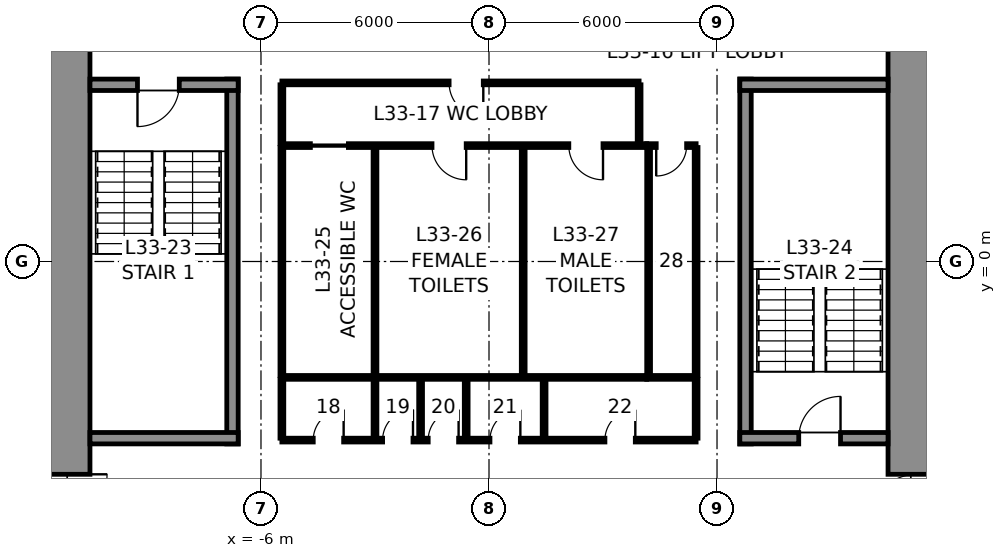
"""IFC4 building model, lengths in metres.
Left out: names, types, materials, properties, quantities, classifications, styles, units other than length and angle.
Written with IfcOpenShell. Run it as: python <this file> out.ifc"""

import sys

from ifc_helpers import new_model, si_unit, direction, frame, frame_2d, origin, place, context, subcontext, project, spatial, rectangle, extrude, element, fill, save


model = new_model("IFC4")
c1 = context("Model", 3, precision=1e-05, world=origin(), true_north=direction((0.0, 1.0)))
c2 = subcontext(c1, "Body", "Model", "MODEL_VIEW")
j1 = project(units=[si_unit("LENGTHUNIT", "METRE"), si_unit("PLANEANGLEUNIT", "RADIAN")], contexts=[c1])
p1 = place(None, origin())
s1 = spatial("IfcSite", under=j1, at=p1, CompositionType="ELEMENT")
p2 = place(p1, origin())
s2 = spatial("IfcBuilding", under=s1, at=p2, CompositionType="ELEMENT")
p3 = place(p2, frame((0.0, 0.0, 159.8)))
s3 = spatial("IfcBuildingStorey", under=s2, at=p3, CompositionType="ELEMENT", Elevation=159.8)
p4 = place(p3, frame((11.25, 10.5, 0.0), z_axis=(0.0, 0.0, 1.0), x_axis=(0.0, -1.0, 0.0)))
e1 = element("IfcWall", 1, at=p4, inside=s3, PredefinedType="SHEAR", context=c2, shape_type="SweptSolid", body=[
    extrude(rectangle(XDim=21.0, YDim=1.5, at=frame_2d((10.5, 0.0))), origin(), (0.0, 0.0, 1.0), 4.0),
])
p5 = place(p4, frame((3.7, 0.0, 0.0)))
e2 = element("IfcOpeningElement", 2, at=p5, cuts=e1, PredefinedType="OPENING", context=c2, shape_type="SweptSolid", body=[
    extrude(rectangle(XDim=1.2, YDim=2.3, at=frame_2d((0.6, 1.15))), frame((0.0, 0.76, 0.0), z_axis=(0.0, -1.0, 0.0), x_axis=(1.0, 0.0, 0.0)), (0.0, 0.0, 1.0), 1.52),
])
p6 = place(p4, frame((16.1, 0.0, 0.0)))
e3 = element("IfcOpeningElement", 3, at=p6, cuts=e1, PredefinedType="OPENING", context=c2, shape_type="SweptSolid", body=[
    extrude(rectangle(XDim=1.2, YDim=2.3, at=frame_2d((0.6, 1.15))), frame((0.0, 0.76, 0.0), z_axis=(0.0, -1.0, 0.0), x_axis=(1.0, 0.0, 0.0)), (0.0, 0.0, 1.0), 1.52),
])
p7 = place(p3, frame((-11.25, -10.5, 0.0), z_axis=(0.0, 0.0, 1.0), x_axis=(0.0, 1.0, 0.0)))
e4 = element("IfcWall", 4, at=p7, inside=s3, PredefinedType="SHEAR", context=c2, shape_type="SweptSolid", body=[
    extrude(rectangle(XDim=21.0, YDim=1.5, at=frame_2d((10.5, 0.0))), origin(), (0.0, 0.0, 1.0), 4.0),
])
p8 = place(p7, frame((16.1, 0.0, 0.0)))
e5 = element("IfcOpeningElement", 5, at=p8, cuts=e4, PredefinedType="OPENING", context=c2, shape_type="SweptSolid", body=[
    extrude(rectangle(XDim=1.2, YDim=2.3, at=frame_2d((0.6, 1.15))), frame((0.0, 0.76, 0.0), z_axis=(0.0, -1.0, 0.0), x_axis=(1.0, 0.0, 0.0)), (0.0, 0.0, 1.0), 1.52),
])
p9 = place(p7, frame((3.7, 0.0, 0.0)))
e6 = element("IfcOpeningElement", 6, at=p9, cuts=e4, PredefinedType="OPENING", context=c2, shape_type="SweptSolid", body=[
    extrude(rectangle(XDim=1.2, YDim=2.3, at=frame_2d((0.6, 1.15))), frame((0.0, 0.76, 0.0), z_axis=(0.0, -1.0, 0.0), x_axis=(1.0, 0.0, 0.0)), (0.0, 0.0, 1.0), 1.52),
])
p10 = place(p3, frame((-6.75, -4.8, 0.0), z_axis=(0.0, 0.0, 1.0), x_axis=(0.0, 1.0, 0.0)))
e7 = element("IfcWall", 7, at=p10, inside=s3, PredefinedType="SOLIDWALL", context=c2, shape_type="SweptSolid", body=[
    extrude(rectangle(XDim=9.6, YDim=0.3, at=frame_2d((4.8, 0.0))), origin(), (0.0, 0.0, 1.0), 3.75),
])
p11 = place(p3, frame((-10.5, 4.65, 0.0), z_axis=(0.0, 0.0, 1.0), x_axis=(1.0, 0.0, 0.0)))
e8 = element("IfcWall", 8, at=p11, inside=s3, PredefinedType="SOLIDWALL", context=c2, shape_type="SweptSolid", body=[
    extrude(rectangle(XDim=3.9, YDim=0.3, at=frame_2d((1.95, 0.0))), origin(), (0.0, 0.0, 1.0), 3.75),
])
p12 = place(p11, frame((1.25, 0.0, 0.0)))
e9 = element("IfcOpeningElement", 9, at=p12, cuts=e8, PredefinedType="OPENING", context=c2, shape_type="SweptSolid", body=[
    extrude(rectangle(XDim=1.1, YDim=2.3, at=frame_2d((0.55, 1.15))), frame((0.0, 0.16, 0.0), z_axis=(0.0, -1.0, 0.0), x_axis=(1.0, 0.0, 0.0)), (0.0, 0.0, 1.0), 0.32),
])
p13 = place(p3, frame((-6.6, -4.65, 0.0), z_axis=(0.0, 0.0, 1.0), x_axis=(-1.0, 0.0, 0.0)))
e10 = element("IfcWall", 10, at=p13, inside=s3, PredefinedType="SOLIDWALL", context=c2, shape_type="SweptSolid", body=[
    extrude(rectangle(XDim=3.9, YDim=0.3, at=frame_2d((1.95, 0.0))), origin(), (0.0, 0.0, 1.0), 3.75),
])
p14 = place(p3, frame((6.75, -4.8, 0.0), z_axis=(0.0, 0.0, 1.0), x_axis=(0.0, 1.0, 0.0)))
e11 = element("IfcWall", 11, at=p14, inside=s3, PredefinedType="SOLIDWALL", context=c2, shape_type="SweptSolid", body=[
    extrude(rectangle(XDim=9.6, YDim=0.3, at=frame_2d((4.8, 0.0))), origin(), (0.0, 0.0, 1.0), 3.75),
])
p15 = place(p3, frame((6.6, 4.65, 0.0), z_axis=(0.0, 0.0, 1.0), x_axis=(1.0, 0.0, 0.0)))
e12 = element("IfcWall", 12, at=p15, inside=s3, PredefinedType="SOLIDWALL", context=c2, shape_type="SweptSolid", body=[
    extrude(rectangle(XDim=3.9, YDim=0.3, at=frame_2d((1.95, 0.0))), origin(), (0.0, 0.0, 1.0), 3.75),
])
p16 = place(p3, frame((10.5, -4.65, 0.0), z_axis=(0.0, 0.0, 1.0), x_axis=(-1.0, 0.0, 0.0)))
e13 = element("IfcWall", 13, at=p16, inside=s3, PredefinedType="SOLIDWALL", context=c2, shape_type="SweptSolid", body=[
    extrude(rectangle(XDim=3.9, YDim=0.3, at=frame_2d((1.95, 0.0))), origin(), (0.0, 0.0, 1.0), 3.75),
])
p17 = place(p16, frame((1.25, 0.0, 0.0)))
e14 = element("IfcOpeningElement", 14, at=p17, cuts=e13, PredefinedType="OPENING", context=c2, shape_type="SweptSolid", body=[
    extrude(rectangle(XDim=1.1, YDim=2.3, at=frame_2d((0.55, 1.15))), frame((0.0, 0.16, 0.0), z_axis=(0.0, -1.0, 0.0), x_axis=(1.0, 0.0, 0.0)), (0.0, 0.0, 1.0), 0.32),
])
p18 = place(p3, frame((-5.45, 3.05, 0.0), z_axis=(0.0, 0.0, 1.0), x_axis=(1.0, 0.0, 0.0)))
e15 = element("IfcWall", 15, at=p18, inside=s3, PredefinedType="PARTITIONING", context=c2, shape_type="SweptSolid", body=[
    extrude(rectangle(XDim=9.6, YDim=0.1, at=frame_2d((4.8, 0.0))), origin(), (0.0, 0.0, 1.0), 3.75),
])
p19 = place(p18, frame((0.75, 0.0, 0.0)))
e16 = element("IfcOpeningElement", 16, at=p19, cuts=e15, PredefinedType="OPENING", context=c2, shape_type="SweptSolid", body=[
    extrude(rectangle(XDim=1.0, YDim=2.3, at=frame_2d((0.5, 1.15))), frame((0.0, 0.06, 0.0), z_axis=(0.0, -1.0, 0.0), x_axis=(1.0, 0.0, 0.0)), (0.0, 0.0, 1.0), 0.12),
])
p20 = place(p18, frame((3.95, 0.0, 0.0)))
e17 = element("IfcOpeningElement", 17, at=p20, cuts=e15, PredefinedType="OPENING", context=c2, shape_type="SweptSolid", body=[
    extrude(rectangle(XDim=0.9, YDim=2.3, at=frame_2d((0.45, 1.15))), frame((0.0, 0.06, 0.0), z_axis=(0.0, -1.0, 0.0), x_axis=(1.0, 0.0, 0.0)), (0.0, 0.0, 1.0), 0.12),
])
p21 = place(p18, frame((7.55, 0.0, 0.0)))
e18 = element("IfcOpeningElement", 18, at=p21, cuts=e15, PredefinedType="OPENING", context=c2, shape_type="SweptSolid", body=[
    extrude(rectangle(XDim=0.9, YDim=2.3, at=frame_2d((0.45, 1.15))), frame((0.0, 0.06, 0.0), z_axis=(0.0, -1.0, 0.0), x_axis=(1.0, 0.0, 0.0)), (0.0, 0.0, 1.0), 0.12),
])
p22 = place(p3, frame((4.15, 3.05, 0.0), z_axis=(0.0, 0.0, 1.0), x_axis=(1.0, 0.0, 0.0)))
e19 = element("IfcWall", 19, at=p22, inside=s3, PredefinedType="PARTITIONING", context=c2, shape_type="SweptSolid", body=[
    extrude(rectangle(XDim=1.3, YDim=0.1, at=frame_2d((0.65, 0.0))), origin(), (0.0, 0.0, 1.0), 3.75),
])
p23 = place(p22, frame((0.25, 0.0, 0.0)))
e20 = element("IfcOpeningElement", 20, at=p23, cuts=e19, PredefinedType="OPENING", context=c2, shape_type="SweptSolid", body=[
    extrude(rectangle(XDim=0.8, YDim=2.3, at=frame_2d((0.4, 1.15))), frame((0.0, 0.06, 0.0), z_axis=(0.0, -1.0, 0.0), x_axis=(1.0, 0.0, 0.0)), (0.0, 0.0, 1.0), 0.12),
])
p24 = place(p3, frame((4.15, -3.05, 0.0), z_axis=(0.0, 0.0, 1.0), x_axis=(-1.0, 0.0, 0.0)))
e21 = element("IfcWall", 21, at=p24, inside=s3, PredefinedType="PARTITIONING", context=c2, shape_type="SweptSolid", body=[
    extrude(rectangle(XDim=9.6, YDim=0.1, at=frame_2d((4.8, 0.0))), origin(), (0.0, 0.0, 1.0), 3.75),
])
p25 = place(p3, frame((5.45, -3.05, 0.0), z_axis=(0.0, 0.0, 1.0), x_axis=(-1.0, 0.0, 0.0)))
e22 = element("IfcWall", 22, at=p25, inside=s3, PredefinedType="PARTITIONING", context=c2, shape_type="SweptSolid", body=[
    extrude(rectangle(XDim=1.3, YDim=0.1, at=frame_2d((0.65, 0.0))), origin(), (0.0, 0.0, 1.0), 3.75),
])
for number, where, z_axis, x_axis in (
    (23, (5.45, 3.0, 0.0), (0.0, 0.0, 1.0), (0.0, -1.0, 0.0)),
    (24, (-5.45, -3.0, 0.0), (0.0, 0.0, 1.0), (0.0, 1.0, 0.0)),
    (25, (-3.0, -3.0, 0.0), (0.0, 0.0, 1.0), (0.0, 1.0, 0.0)),
    (26, (0.9, -3.0, 0.0), (0.0, 0.0, 1.0), (0.0, 1.0, 0.0)),
    (27, (4.2, -3.0, 0.0), (0.0, 0.0, 1.0), (0.0, 1.0, 0.0)),
):
    element("IfcWall", number, at=place(p3, frame(where, z_axis=z_axis, x_axis=x_axis)), inside=s3, PredefinedType="PARTITIONING", context=c2, shape_type="SweptSolid", body=[
        extrude(rectangle(XDim=6.0, YDim=0.1, at=frame_2d((3.0, 0.0))), origin(), (0.0, 0.0, 1.0), 3.75),
    ])
p26 = place(p3, frame((-5.45, 4.7, 0.0), z_axis=(0.0, 0.0, 1.0), x_axis=(1.0, 0.0, 0.0)))
e28 = element("IfcWall", 28, at=p26, inside=s3, PredefinedType="PARTITIONING", context=c2, shape_type="SweptSolid", body=[
    extrude(rectangle(XDim=9.4, YDim=0.1, at=frame_2d((4.7, 0.0))), origin(), (0.0, 0.0, 1.0), 3.75),
])
p27 = place(p26, frame((4.4, 0.0, 0.0)))
e29 = element("IfcOpeningElement", 29, at=p27, cuts=e28, PredefinedType="OPENING", context=c2, shape_type="SweptSolid", body=[
    extrude(rectangle(XDim=0.9, YDim=2.3, at=frame_2d((0.45, 1.15))), frame((0.0, 0.06, 0.0), z_axis=(0.0, -1.0, 0.0), x_axis=(1.0, 0.0, 0.0)), (0.0, 0.0, 1.0), 0.12),
])
for number, where, z_axis, x_axis in (
    (30, (-5.45, 3.1, 0.0), (0.0, 0.0, 1.0), (0.0, 1.0, 0.0)),
    (31, (3.95, 3.1, 0.0), (0.0, 0.0, 1.0), (0.0, 1.0, 0.0)),
):
    element("IfcWall", number, at=place(p3, frame(where, z_axis=z_axis, x_axis=x_axis)), inside=s3, PredefinedType="PARTITIONING", context=c2, shape_type="SweptSolid", body=[
        extrude(rectangle(XDim=1.55, YDim=0.1, at=frame_2d((0.775, 0.0))), origin(), (0.0, 0.0, 1.0), 3.75),
    ])
p28 = place(p3, frame((5.45, -4.7, 0.0), z_axis=(0.0, 0.0, 1.0), x_axis=(-1.0, 0.0, 0.0)))
e32 = element("IfcWall", 32, at=p28, inside=s3, PredefinedType="PARTITIONING", context=c2, shape_type="SweptSolid", body=[
    extrude(rectangle(XDim=10.9, YDim=0.1, at=frame_2d((5.45, 0.0))), origin(), (0.0, 0.0, 1.0), 3.75),
])
p29 = place(p28, frame((9.275, 0.0, 0.0)))
e33 = element("IfcOpeningElement", 33, at=p29, cuts=e32, PredefinedType="OPENING", context=c2, shape_type="SweptSolid", body=[
    extrude(rectangle(XDim=0.8, YDim=2.3, at=frame_2d((0.4, 1.15))), frame((0.0, 0.06, 0.0), z_axis=(0.0, -1.0, 0.0), x_axis=(1.0, 0.0, 0.0)), (0.0, 0.0, 1.0), 0.12),
])
p30 = place(p28, frame((7.45, 0.0, 0.0)))
e34 = element("IfcOpeningElement", 34, at=p30, cuts=e32, PredefinedType="OPENING", context=c2, shape_type="SweptSolid", body=[
    extrude(rectangle(XDim=0.8, YDim=2.3, at=frame_2d((0.4, 1.15))), frame((0.0, 0.06, 0.0), z_axis=(0.0, -1.0, 0.0), x_axis=(1.0, 0.0, 0.0)), (0.0, 0.0, 1.0), 0.12),
])
p31 = place(p28, frame((6.25, 0.0, 0.0)))
e35 = element("IfcOpeningElement", 35, at=p31, cuts=e32, PredefinedType="OPENING", context=c2, shape_type="SweptSolid", body=[
    extrude(rectangle(XDim=0.8, YDim=2.3, at=frame_2d((0.4, 1.15))), frame((0.0, 0.06, 0.0), z_axis=(0.0, -1.0, 0.0), x_axis=(1.0, 0.0, 0.0)), (0.0, 0.0, 1.0), 0.12),
])
p32 = place(p28, frame((4.625, 0.0, 0.0)))
e36 = element("IfcOpeningElement", 36, at=p32, cuts=e32, PredefinedType="OPENING", context=c2, shape_type="SweptSolid", body=[
    extrude(rectangle(XDim=0.8, YDim=2.3, at=frame_2d((0.4, 1.15))), frame((0.0, 0.06, 0.0), z_axis=(0.0, -1.0, 0.0), x_axis=(1.0, 0.0, 0.0)), (0.0, 0.0, 1.0), 0.12),
])
p33 = place(p28, frame((1.6, 0.0, 0.0)))
e37 = element("IfcOpeningElement", 37, at=p33, cuts=e32, PredefinedType="OPENING", context=c2, shape_type="SweptSolid", body=[
    extrude(rectangle(XDim=0.8, YDim=2.3, at=frame_2d((0.4, 1.15))), frame((0.0, 0.06, 0.0), z_axis=(0.0, -1.0, 0.0), x_axis=(1.0, 0.0, 0.0)), (0.0, 0.0, 1.0), 0.12),
])
for number, where, z_axis, x_axis in (
    (38, (-5.45, -3.1, 0.0), (0.0, 0.0, 1.0), (0.0, -1.0, 0.0)),
    (39, (5.45, -3.1, 0.0), (0.0, 0.0, 1.0), (0.0, -1.0, 0.0)),
    (40, (-3.0, -3.1, 0.0), (0.0, 0.0, 1.0), (0.0, -1.0, 0.0)),
    (41, (-1.8, -3.1, 0.0), (0.0, 0.0, 1.0), (0.0, -1.0, 0.0)),
    (42, (-0.6, -3.1, 0.0), (0.0, 0.0, 1.0), (0.0, -1.0, 0.0)),
    (43, (1.45, -3.1, 0.0), (0.0, 0.0, 1.0), (0.0, -1.0, 0.0)),
):
    element("IfcWall", number, at=place(p3, frame(where, z_axis=z_axis, x_axis=x_axis)), inside=s3, PredefinedType="PARTITIONING", context=c2, shape_type="SweptSolid", body=[
        extrude(rectangle(XDim=1.55, YDim=0.1, at=frame_2d((0.775, 0.0))), origin(), (0.0, 0.0, 1.0), 3.75),
    ])
p34 = place(p12, frame((1.1, 0.0, 0.0), z_axis=(0.0, 0.0, 1.0), x_axis=(-1.0, 0.0, 0.0)))
e44 = element("IfcDoor", 44, at=p34, inside=s3, OperationType="SINGLE_SWING_RIGHT", PredefinedType="DOOR", context=c2, shape_type="SweptSolid", body=[
    extrude(rectangle(XDim=1.1, YDim=2.3, at=frame_2d((0.55, 1.15))), frame((0.0, 0.025, 0.0), z_axis=(0.0, -1.0, 0.0), x_axis=(1.0, 0.0, 0.0)), (0.0, 0.0, 1.0), 0.05),
])
fill(e9, e44)
p35 = place(p17, frame((1.1, 0.0, 0.0), z_axis=(0.0, 0.0, 1.0), x_axis=(-1.0, 0.0, 0.0)))
e45 = element("IfcDoor", 45, at=p35, inside=s3, OperationType="SINGLE_SWING_RIGHT", PredefinedType="DOOR", context=c2, shape_type="SweptSolid", body=[
    extrude(rectangle(XDim=1.1, YDim=2.3, at=frame_2d((0.55, 1.15))), frame((0.0, 0.025, 0.0), z_axis=(0.0, -1.0, 0.0), x_axis=(1.0, 0.0, 0.0)), (0.0, 0.0, 1.0), 0.05),
])
fill(e14, e45)
p36 = place(p19, frame((1.0, 0.0, 0.0), z_axis=(0.0, 0.0, 1.0), x_axis=(-1.0, 0.0, 0.0)))
e46 = element("IfcDoor", 46, at=p36, inside=s3, OperationType="SLIDING_TO_LEFT", PredefinedType="DOOR", context=c2, shape_type="SweptSolid", body=[
    extrude(rectangle(XDim=1.0, YDim=2.3, at=frame_2d((0.5, 1.15))), frame((0.0, 0.025, 0.0), z_axis=(0.0, -1.0, 0.0), x_axis=(1.0, 0.0, 0.0)), (0.0, 0.0, 1.0), 0.05),
])
fill(e16, e46)
p37 = place(p20, frame((0.9, 0.0, 0.0), z_axis=(0.0, 0.0, 1.0), x_axis=(-1.0, 0.0, 0.0)))
e47 = element("IfcDoor", 47, at=p37, inside=s3, OperationType="SINGLE_SWING_LEFT", PredefinedType="DOOR", context=c2, shape_type="SweptSolid", body=[
    extrude(rectangle(XDim=0.9, YDim=2.3, at=frame_2d((0.45, 1.15))), frame((0.0, 0.025, 0.0), z_axis=(0.0, -1.0, 0.0), x_axis=(1.0, 0.0, 0.0)), (0.0, 0.0, 1.0), 0.05),
])
fill(e17, e47)
p38 = place(p21, frame((0.9, 0.0, 0.0), z_axis=(0.0, 0.0, 1.0), x_axis=(-1.0, 0.0, 0.0)))
e48 = element("IfcDoor", 48, at=p38, inside=s3, OperationType="SINGLE_SWING_LEFT", PredefinedType="DOOR", context=c2, shape_type="SweptSolid", body=[
    extrude(rectangle(XDim=0.9, YDim=2.3, at=frame_2d((0.45, 1.15))), frame((0.0, 0.025, 0.0), z_axis=(0.0, -1.0, 0.0), x_axis=(1.0, 0.0, 0.0)), (0.0, 0.0, 1.0), 0.05),
])
fill(e18, e48)
p39 = place(p23, frame((0.8, 0.0, 0.0), z_axis=(0.0, 0.0, 1.0), x_axis=(-1.0, 0.0, 0.0)))
e49 = element("IfcDoor", 49, at=p39, inside=s3, OperationType="SINGLE_SWING_RIGHT", PredefinedType="DOOR", context=c2, shape_type="SweptSolid", body=[
    extrude(rectangle(XDim=0.8, YDim=2.3, at=frame_2d((0.4, 1.15))), frame((0.0, 0.025, 0.0), z_axis=(0.0, -1.0, 0.0), x_axis=(1.0, 0.0, 0.0)), (0.0, 0.0, 1.0), 0.05),
])
fill(e20, e49)
p40 = place(p27, frame((0.9, 0.0, 0.0), z_axis=(0.0, 0.0, 1.0), x_axis=(-1.0, 0.0, 0.0)))
e50 = element("IfcDoor", 50, at=p40, inside=s3, OperationType="SINGLE_SWING_LEFT", PredefinedType="DOOR", context=c2, shape_type="SweptSolid", body=[
    extrude(rectangle(XDim=0.9, YDim=2.3, at=frame_2d((0.45, 1.15))), frame((0.0, 0.025, 0.0), z_axis=(0.0, -1.0, 0.0), x_axis=(1.0, 0.0, 0.0)), (0.0, 0.0, 1.0), 0.05),
])
fill(e29, e50)
p41 = place(p29, frame((0.8, 0.0, 0.0), z_axis=(0.0, 0.0, 1.0), x_axis=(-1.0, 0.0, 0.0)))
e51 = element("IfcDoor", 51, at=p41, inside=s3, OperationType="SINGLE_SWING_RIGHT", PredefinedType="DOOR", context=c2, shape_type="SweptSolid", body=[
    extrude(rectangle(XDim=0.8, YDim=2.3, at=frame_2d((0.4, 1.15))), frame((0.0, 0.025, 0.0), z_axis=(0.0, -1.0, 0.0), x_axis=(1.0, 0.0, 0.0)), (0.0, 0.0, 1.0), 0.05),
])
fill(e33, e51)
p42 = place(p30, frame((0.8, 0.0, 0.0), z_axis=(0.0, 0.0, 1.0), x_axis=(-1.0, 0.0, 0.0)))
e52 = element("IfcDoor", 52, at=p42, inside=s3, OperationType="SINGLE_SWING_RIGHT", PredefinedType="DOOR", context=c2, shape_type="SweptSolid", body=[
    extrude(rectangle(XDim=0.8, YDim=2.3, at=frame_2d((0.4, 1.15))), frame((0.0, 0.025, 0.0), z_axis=(0.0, -1.0, 0.0), x_axis=(1.0, 0.0, 0.0)), (0.0, 0.0, 1.0), 0.05),
])
fill(e34, e52)
p43 = place(p31, frame((0.8, 0.0, 0.0), z_axis=(0.0, 0.0, 1.0), x_axis=(-1.0, 0.0, 0.0)))
e53 = element("IfcDoor", 53, at=p43, inside=s3, OperationType="SINGLE_SWING_RIGHT", PredefinedType="DOOR", context=c2, shape_type="SweptSolid", body=[
    extrude(rectangle(XDim=0.8, YDim=2.3, at=frame_2d((0.4, 1.15))), frame((0.0, 0.025, 0.0), z_axis=(0.0, -1.0, 0.0), x_axis=(1.0, 0.0, 0.0)), (0.0, 0.0, 1.0), 0.05),
])
fill(e35, e53)
p44 = place(p32, frame((0.8, 0.0, 0.0), z_axis=(0.0, 0.0, 1.0), x_axis=(-1.0, 0.0, 0.0)))
e54 = element("IfcDoor", 54, at=p44, inside=s3, OperationType="SINGLE_SWING_RIGHT", PredefinedType="DOOR", context=c2, shape_type="SweptSolid", body=[
    extrude(rectangle(XDim=0.8, YDim=2.3, at=frame_2d((0.4, 1.15))), frame((0.0, 0.025, 0.0), z_axis=(0.0, -1.0, 0.0), x_axis=(1.0, 0.0, 0.0)), (0.0, 0.0, 1.0), 0.05),
])
fill(e36, e54)
p45 = place(p33, frame((0.8, 0.0, 0.0), z_axis=(0.0, 0.0, 1.0), x_axis=(-1.0, 0.0, 0.0)))
e55 = element("IfcDoor", 55, at=p45, inside=s3, OperationType="SINGLE_SWING_RIGHT", PredefinedType="DOOR", context=c2, shape_type="SweptSolid", body=[
    extrude(rectangle(XDim=0.8, YDim=2.3, at=frame_2d((0.4, 1.15))), frame((0.0, 0.025, 0.0), z_axis=(0.0, -1.0, 0.0), x_axis=(1.0, 0.0, 0.0)), (0.0, 0.0, 1.0), 0.05),
])
fill(e37, e55)
p46 = place(p9, frame((1.2, 0.0, 0.0), z_axis=(0.0, 0.0, 1.0), x_axis=(-1.0, 0.0, 0.0)))
e56 = element("IfcDoor", 56, at=p46, inside=s3, OperationType="SINGLE_SWING_LEFT", PredefinedType="DOOR", context=c2, shape_type="SweptSolid", body=[
    extrude(rectangle(XDim=1.2, YDim=2.3, at=frame_2d((0.6, 1.15))), frame((0.0, 0.025, 0.0), z_axis=(0.0, -1.0, 0.0), x_axis=(1.0, 0.0, 0.0)), (0.0, 0.0, 1.0), 0.05),
])
fill(e6, e56)
p47 = place(p6, frame((1.2, 0.0, 0.0), z_axis=(0.0, 0.0, 1.0), x_axis=(-1.0, 0.0, 0.0)))
e57 = element("IfcDoor", 57, at=p47, inside=s3, OperationType="SINGLE_SWING_LEFT", PredefinedType="DOOR", context=c2, shape_type="SweptSolid", body=[
    extrude(rectangle(XDim=1.2, YDim=2.3, at=frame_2d((0.6, 1.15))), frame((0.0, 0.025, 0.0), z_axis=(0.0, -1.0, 0.0), x_axis=(1.0, 0.0, 0.0)), (0.0, 0.0, 1.0), 0.05),
])
fill(e3, e57)
save(model, sys.argv[1])
